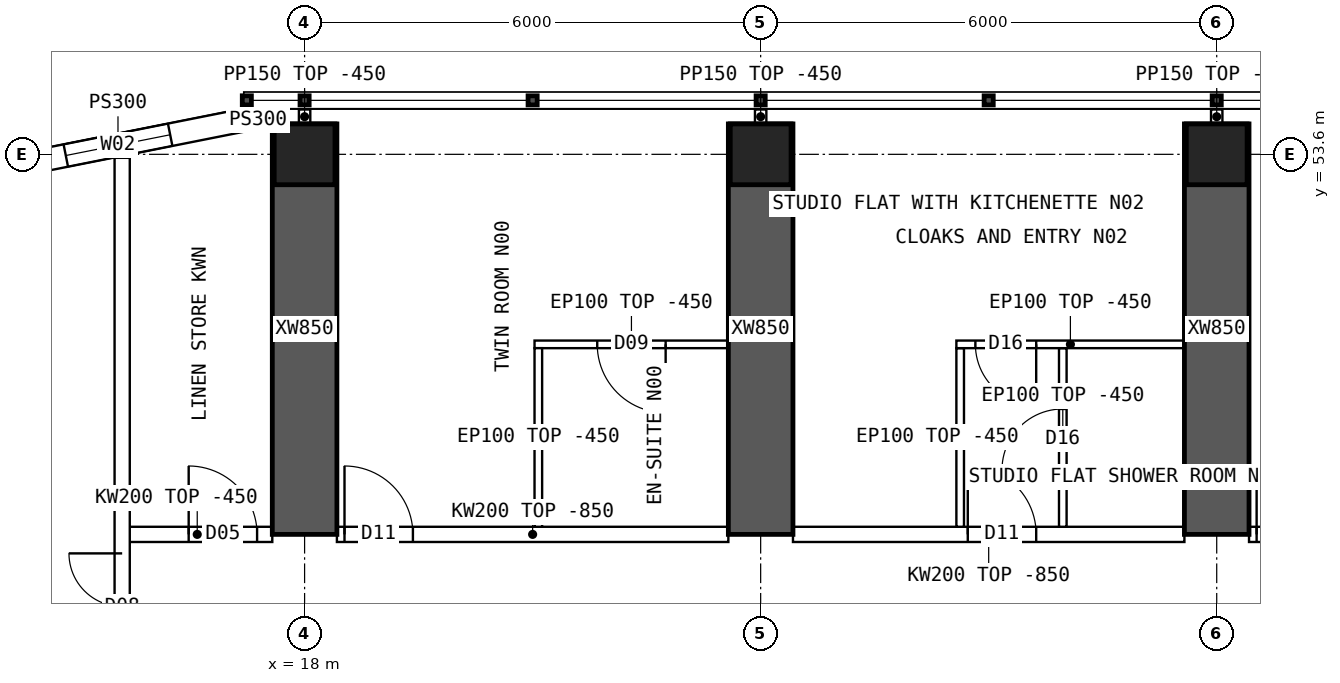
"""IFC4 building model, lengths in metres.
Left out: names, types, materials, properties, quantities, classifications, styles, units other than length and angle.
Written with IfcOpenShell. Run it as: python <this file> out.ifc"""

import sys

from ifc_helpers import new_model, si_unit, direction, frame, frame_2d, origin, origin_2d, place, context, subcontext, project, spatial, polyline, rectangle, hollow_rectangle, outline, extrude, element, fill, save


model = new_model("IFC4")
c1 = context("Model", 3, precision=1e-05, world=origin(), true_north=direction((0.0, 1.0)))
c2 = subcontext(c1, "Body", "Model", "MODEL_VIEW")
j1 = project(units=[si_unit("LENGTHUNIT", "METRE"), si_unit("PLANEANGLEUNIT", "RADIAN")], contexts=[c1])
p1 = place(None, origin())
s1 = spatial("IfcSite", under=j1, at=p1, CompositionType="ELEMENT")
p2 = place(p1, origin())
s2 = spatial("IfcBuilding", under=s1, at=p2, CompositionType="ELEMENT")
p3 = place(p2, frame((0.0, 0.0, 144.85)))
s3 = spatial("IfcBuildingStorey", under=s2, at=p3, CompositionType="ELEMENT", Elevation=144.85)
for number, where, z_axis, x_axis in (
    (1, (18.0, 53.6, 0.0), (0.0, 0.0, 1.0), (1.0, 0.0, 0.0)),
    (2, (24.0, 53.6, 0.0), (0.0, 0.0, 1.0), (1.0, 0.0, 0.0)),
    (3, (30.0, 53.6, 0.0), (0.0, 0.0, 1.0), (1.0, 0.0, 0.0)),
):
    element("IfcColumn", number, at=place(p3, frame(where, z_axis=z_axis, x_axis=x_axis)), inside=s3, PredefinedType="COLUMN", context=c2, shape_type="SweptSolid", body=[
        extrude(hollow_rectangle(XDim=0.8, YDim=0.8, WallThickness=0.08, at=origin_2d()), origin(), (0.0, 0.0, 1.0), 3.75),
    ])
for number, where, z_axis, x_axis in (
    (4, (18.0, 48.6, 0.0), (0.0, 0.0, 1.0), (0.0, 1.0, 0.0)),
    (5, (24.0, 48.6, 0.0), (0.0, 0.0, 1.0), (0.0, 1.0, 0.0)),
    (6, (30.0, 48.6, 0.0), (0.0, 0.0, 1.0), (0.0, 1.0, 0.0)),
):
    element("IfcWall", number, at=place(p3, frame(where, z_axis=z_axis, x_axis=x_axis)), inside=s3, PredefinedType="SHEAR", context=c2, shape_type="SweptSolid", body=[
        extrude(rectangle(XDim=5.4, YDim=0.85, at=frame_2d((2.7, 0.0))), origin(), (0.0, 0.0, 1.0), 3.75),
    ])
p4 = place(p3, frame((17.2, 54.05, 0.0), z_axis=(0.0, 0.0, 1.0), x_axis=(-0.98078325777, -0.195100490205, 0.0)))
e7 = element("IfcWall", 7, at=p4, inside=s3, PredefinedType="SOLIDWALL", context=c2, shape_type="SweptSolid", body=[
    extrude(outline(polyline([(-0.03, -0.15), (3.405, -0.15), (3.345, 0.15), (0.03, 0.15), (-0.03, -0.15)])), origin(), (0.0, 0.0, 1.0), 3.3),
])
p5 = place(p4, frame((0.988, 0.0, 0.9)))
e8 = element("IfcOpeningElement", 8, at=p5, cuts=e7, PredefinedType="OPENING", context=c2, shape_type="SweptSolid", body=[
    extrude(rectangle(XDim=1.4, YDim=1.8, at=frame_2d((0.7, 0.9))), frame((0.0, 0.16, 0.0), z_axis=(0.0, -1.0, 0.0), x_axis=(1.0, 0.0, 0.0)), (0.0, 0.0, 1.0), 0.32),
])
p6 = place(p3, frame((17.2, 54.05, 0.0), z_axis=(0.0, 0.0, 1.0), x_axis=(1.0, 0.0, 0.0)))
e9 = element("IfcWall", 9, at=p6, inside=s3, PredefinedType="SOLIDWALL", context=c2, shape_type="SweptSolid", body=[
    extrude(rectangle(XDim=0.375, YDim=0.3, at=frame_2d((0.188, 0.0))), origin(), (0.0, 0.0, 1.0), 3.3),
])
p7 = place(p3, frame((15.6, 48.6, 0.0), z_axis=(0.0, 0.0, 1.0), x_axis=(1.0, 0.0, 0.0)))
e10 = element("IfcWall", 10, at=p7, inside=s3, PredefinedType="SOLIDWALL", context=c2, shape_type="SweptSolid", body=[
    extrude(rectangle(XDim=1.975, YDim=0.2, at=frame_2d((0.987, 0.0))), origin(), (0.0, 0.0, 1.0), 3.3),
])
p8 = place(p7, frame((0.875, 0.0, 0.0)))
e11 = element("IfcOpeningElement", 11, at=p8, cuts=e10, PredefinedType="OPENING", context=c2, shape_type="SweptSolid", body=[
    extrude(rectangle(XDim=0.9, YDim=2.1, at=frame_2d((0.45, 1.05))), frame((0.0, 0.11, 0.0), z_axis=(0.0, -1.0, 0.0), x_axis=(1.0, 0.0, 0.0)), (0.0, 0.0, 1.0), 0.22),
])
p9 = place(p3, frame((18.425, 48.6, 0.0), z_axis=(0.0, 0.0, 1.0), x_axis=(1.0, 0.0, 0.0)))
e12 = element("IfcWall", 12, at=p9, inside=s3, PredefinedType="SOLIDWALL", context=c2, shape_type="SweptSolid", body=[
    extrude(outline(polyline([(0.0, 0.0), (5.15, 0.0), (5.15, 2.9), (0.0, 2.9), (0.0, 0.0)])), frame((0.0, 0.1, 0.0), z_axis=(0.0, -1.0, 0.0), x_axis=(1.0, 0.0, 0.0)), (0.0, 0.0, 1.0), 0.2),
])
p10 = place(p9, frame((0.1, 0.0, 0.0)))
e13 = element("IfcOpeningElement", 13, at=p10, cuts=e12, PredefinedType="OPENING", context=c2, shape_type="SweptSolid", body=[
    extrude(rectangle(XDim=0.9, YDim=2.1, at=frame_2d((0.45, 1.05))), frame((0.0, 0.11, 0.0), z_axis=(0.0, -1.0, 0.0), x_axis=(1.0, 0.0, 0.0)), (0.0, 0.0, 1.0), 0.22),
])
p11 = place(p3, frame((24.425, 48.6, 0.0), z_axis=(0.0, 0.0, 1.0), x_axis=(1.0, 0.0, 0.0)))
e14 = element("IfcWall", 14, at=p11, inside=s3, PredefinedType="SOLIDWALL", context=c2, shape_type="SweptSolid", body=[
    extrude(outline(polyline([(0.0, 0.0), (5.15, 0.0), (5.15, 2.9), (0.0, 2.9), (0.0, 0.0)])), frame((0.0, 0.1, 0.0), z_axis=(0.0, -1.0, 0.0), x_axis=(1.0, 0.0, 0.0)), (0.0, 0.0, 1.0), 0.2),
])
p12 = place(p11, frame((2.3, 0.0, 0.0)))
e15 = element("IfcOpeningElement", 15, at=p12, cuts=e14, PredefinedType="OPENING", context=c2, shape_type="SweptSolid", body=[
    extrude(rectangle(XDim=0.9, YDim=2.1, at=frame_2d((0.45, 1.05))), frame((0.0, 0.11, 0.0), z_axis=(0.0, -1.0, 0.0), x_axis=(1.0, 0.0, 0.0)), (0.0, 0.0, 1.0), 0.22),
])
p13 = place(p3, frame((30.425, 48.6, 0.0), z_axis=(0.0, 0.0, 1.0), x_axis=(1.0, 0.0, 0.0)))
e16 = element("IfcWall", 16, at=p13, inside=s3, PredefinedType="SOLIDWALL", context=c2, shape_type="SweptSolid", body=[
    extrude(outline(polyline([(0.0, 0.0), (5.15, 0.0), (5.15, 2.9), (0.0, 2.9), (0.0, 0.0)])), frame((0.0, 0.1, 0.0), z_axis=(0.0, -1.0, 0.0), x_axis=(1.0, 0.0, 0.0)), (0.0, 0.0, 1.0), 0.2),
])
p14 = place(p13, frame((0.1, 0.0, 0.0)))
e17 = element("IfcOpeningElement", 17, at=p14, cuts=e16, PredefinedType="OPENING", context=c2, shape_type="SweptSolid", body=[
    extrude(rectangle(XDim=0.9, YDim=2.1, at=frame_2d((0.45, 1.05))), frame((0.0, 0.11, 0.0), z_axis=(0.0, -1.0, 0.0), x_axis=(1.0, 0.0, 0.0)), (0.0, 0.0, 1.0), 0.22),
])
p15 = place(p3, frame((21.025, 51.1, 0.0), z_axis=(0.0, 0.0, 1.0), x_axis=(1.0, 0.0, 0.0)))
e18 = element("IfcWall", 18, at=p15, inside=s3, PredefinedType="PARTITIONING", context=c2, shape_type="SweptSolid", body=[
    extrude(rectangle(XDim=2.55, YDim=0.1, at=frame_2d((1.275, 0.0))), origin(), (0.0, 0.0, 1.0), 3.3),
])
p16 = place(p15, frame((0.825, 0.0, 0.0)))
e19 = element("IfcOpeningElement", 19, at=p16, cuts=e18, PredefinedType="OPENING", context=c2, shape_type="SweptSolid", body=[
    extrude(rectangle(XDim=0.9, YDim=2.1, at=frame_2d((0.45, 1.05))), frame((0.0, 0.06, 0.0), z_axis=(0.0, -1.0, 0.0), x_axis=(1.0, 0.0, 0.0)), (0.0, 0.0, 1.0), 0.12),
])
p17 = place(p3, frame((21.075, 51.05, 0.0), z_axis=(0.0, 0.0, 1.0), x_axis=(0.0, -1.0, 0.0)))
e20 = element("IfcWall", 20, at=p17, inside=s3, PredefinedType="PARTITIONING", context=c2, shape_type="SweptSolid", body=[
    extrude(outline(polyline([(0.0, 0.0), (2.35, 0.0), (2.35, 2.9), (2.302, 2.9), (2.3, 3.3), (0.0, 3.3), (0.0, 0.0)])), frame((0.0, 0.05, 0.0), z_axis=(0.0, -1.0, 0.0), x_axis=(1.0, 0.0, 0.0)), (0.0, 0.0, 1.0), 0.1),
])
p18 = place(p3, frame((26.575, 51.1, 0.0), z_axis=(0.0, 0.0, 1.0), x_axis=(1.0, 0.0, 0.0)))
e21 = element("IfcWall", 21, at=p18, inside=s3, PredefinedType="PARTITIONING", context=c2, shape_type="SweptSolid", body=[
    extrude(rectangle(XDim=3.0, YDim=0.1, at=frame_2d((1.5, 0.0))), origin(), (0.0, 0.0, 1.0), 3.3),
])
p19 = place(p18, frame((0.25, 0.0, 0.0)))
e22 = element("IfcOpeningElement", 22, at=p19, cuts=e21, PredefinedType="OPENING", context=c2, shape_type="SweptSolid", body=[
    extrude(rectangle(XDim=0.8, YDim=2.1, at=frame_2d((0.4, 1.05))), frame((0.0, 0.06, 0.0), z_axis=(0.0, -1.0, 0.0), x_axis=(1.0, 0.0, 0.0)), (0.0, 0.0, 1.0), 0.12),
])
p20 = place(p3, frame((26.625, 51.05, 0.0), z_axis=(0.0, 0.0, 1.0), x_axis=(0.0, -1.0, 0.0)))
e23 = element("IfcWall", 23, at=p20, inside=s3, PredefinedType="PARTITIONING", context=c2, shape_type="SweptSolid", body=[
    extrude(outline(polyline([(0.0, 0.0), (2.35, 0.0), (2.35, 2.9), (2.302, 2.9), (2.3, 3.3), (0.0, 3.3), (0.0, 0.0)])), frame((0.0, 0.05, 0.0), z_axis=(0.0, -1.0, 0.0), x_axis=(1.0, 0.0, 0.0)), (0.0, 0.0, 1.0), 0.1),
])
p21 = place(p3, frame((27.975, 51.05, 0.0), z_axis=(0.0, 0.0, 1.0), x_axis=(0.0, -1.0, 0.0)))
e24 = element("IfcWall", 24, at=p21, inside=s3, PredefinedType="PARTITIONING", context=c2, shape_type="SweptSolid", body=[
    extrude(outline(polyline([(0.0, 0.0), (2.35, 0.0), (2.35, 2.9), (2.302, 2.9), (2.3, 3.3), (0.0, 3.3), (0.0, 0.0)])), frame((0.0, 0.05, 0.0), z_axis=(0.0, -1.0, 0.0), x_axis=(1.0, 0.0, 0.0)), (0.0, 0.0, 1.0), 0.1),
])
p22 = place(p21, frame((0.8, 0.0, 0.0)))
e25 = element("IfcOpeningElement", 25, at=p22, cuts=e24, PredefinedType="OPENING", context=c2, shape_type="SweptSolid", body=[
    extrude(rectangle(XDim=0.8, YDim=2.1, at=frame_2d((0.4, 1.05))), frame((0.0, 0.06, 0.0), z_axis=(0.0, -1.0, 0.0), x_axis=(1.0, 0.0, 0.0)), (0.0, 0.0, 1.0), 0.12),
])
p23 = place(p3, frame((15.6, 10.446, 0.0), z_axis=(0.0, 0.0, 1.0), x_axis=(0.0, 1.0, 0.0)))
e26 = element("IfcWall", 26, at=p23, inside=s3, PredefinedType="SOLIDWALL", context=c2, shape_type="SweptSolid", body=[
    extrude(rectangle(XDim=43.107, YDim=0.2, at=frame_2d((21.554, 0.0))), origin(), (0.0, 0.0, 1.0), 3.3),
])
p24 = place(p23, frame((5.104, 0.0, 0.0)))
e27 = element("IfcOpeningElement", 27, at=p24, cuts=e26, PredefinedType="OPENING", context=c2, shape_type="SweptSolid", body=[
    extrude(rectangle(XDim=1.4, YDim=2.1, at=frame_2d((0.7, 1.05))), frame((0.0, 0.11, 0.0), z_axis=(0.0, -1.0, 0.0), x_axis=(1.0, 0.0, 0.0)), (0.0, 0.0, 1.0), 0.22),
])
p25 = place(p23, frame((36.504, 0.0, 0.0)))
e28 = element("IfcOpeningElement", 28, at=p25, cuts=e26, PredefinedType="OPENING", context=c2, shape_type="SweptSolid", body=[
    extrude(rectangle(XDim=1.4, YDim=2.1, at=frame_2d((0.7, 1.05))), frame((0.0, 0.11, 0.0), z_axis=(0.0, -1.0, 0.0), x_axis=(1.0, 0.0, 0.0)), (0.0, 0.0, 1.0), 0.22),
])
for number, where, z_axis, x_axis in (
    (29, (18.0, 54.0, 0.0), (0.0, 0.0, 1.0), (0.0, 1.0, 0.0)),
    (30, (24.0, 54.0, 0.0), (0.0, 0.0, 1.0), (0.0, 1.0, 0.0)),
    (31, (30.0, 54.0, 0.0), (0.0, 0.0, 1.0), (0.0, 1.0, 0.0)),
):
    element("IfcWall", number, at=place(p3, frame(where, z_axis=z_axis, x_axis=x_axis)), inside=s3, PredefinedType="PARTITIONING", context=c2, shape_type="SweptSolid", body=[
        extrude(rectangle(XDim=0.19, YDim=0.15, at=frame_2d((0.095, 0.0))), origin(), (0.0, 0.0, 1.0), 3.3),
    ])
p26 = place(p5, origin())
e32 = element("IfcWindow", 32, at=p26, inside=s3, PartitioningType="SINGLE_PANEL", PredefinedType="WINDOW", context=c2, shape_type="SweptSolid", body=[
    extrude(rectangle(XDim=1.4, YDim=1.8, at=frame_2d((0.7, 0.9))), frame((0.0, 0.03, 0.0), z_axis=(0.0, -1.0, 0.0), x_axis=(1.0, 0.0, 0.0)), (0.0, 0.0, 1.0), 0.06),
])
fill(e8, e32)
p27 = place(p16, origin())
e33 = element("IfcDoor", 33, at=p27, inside=s3, OperationType="SINGLE_SWING_RIGHT", PredefinedType="DOOR", context=c2, shape_type="SweptSolid", body=[
    extrude(rectangle(XDim=0.9, YDim=2.1, at=frame_2d((0.45, 1.05))), frame((0.0, 0.025, 0.0), z_axis=(0.0, -1.0, 0.0), x_axis=(1.0, 0.0, 0.0)), (0.0, 0.0, 1.0), 0.05),
])
fill(e19, e33)
p28 = place(p10, origin())
e34 = element("IfcDoor", 34, at=p28, inside=s3, OperationType="SINGLE_SWING_LEFT", PredefinedType="DOOR", context=c2, shape_type="SweptSolid", body=[
    extrude(rectangle(XDim=0.9, YDim=2.1, at=frame_2d((0.45, 1.05))), frame((0.0, 0.025, 0.0), z_axis=(0.0, -1.0, 0.0), x_axis=(1.0, 0.0, 0.0)), (0.0, 0.0, 1.0), 0.05),
])
fill(e13, e34)
p29 = place(p19, origin())
e35 = element("IfcDoor", 35, at=p29, inside=s3, OperationType="SINGLE_SWING_RIGHT", PredefinedType="DOOR", context=c2, shape_type="SweptSolid", body=[
    extrude(rectangle(XDim=0.8, YDim=2.1, at=frame_2d((0.4, 1.05))), frame((0.0, 0.025, 0.0), z_axis=(0.0, -1.0, 0.0), x_axis=(1.0, 0.0, 0.0)), (0.0, 0.0, 1.0), 0.05),
])
fill(e22, e35)
p30 = place(p22, origin())
e36 = element("IfcDoor", 36, at=p30, inside=s3, OperationType="SINGLE_SWING_RIGHT", PredefinedType="DOOR", context=c2, shape_type="SweptSolid", body=[
    extrude(rectangle(XDim=0.8, YDim=2.1, at=frame_2d((0.4, 1.05))), frame((0.0, 0.025, 0.0), z_axis=(0.0, -1.0, 0.0), x_axis=(1.0, 0.0, 0.0)), (0.0, 0.0, 1.0), 0.05),
])
fill(e25, e36)
p31 = place(p12, origin())
e37 = element("IfcDoor", 37, at=p31, inside=s3, OperationType="SINGLE_SWING_LEFT", PredefinedType="DOOR", context=c2, shape_type="SweptSolid", body=[
    extrude(rectangle(XDim=0.9, YDim=2.1, at=frame_2d((0.45, 1.05))), frame((0.0, 0.025, 0.0), z_axis=(0.0, -1.0, 0.0), x_axis=(1.0, 0.0, 0.0)), (0.0, 0.0, 1.0), 0.05),
])
fill(e15, e37)
p32 = place(p14, origin())
e38 = element("IfcDoor", 38, at=p32, inside=s3, OperationType="SINGLE_SWING_LEFT", PredefinedType="DOOR", context=c2, shape_type="SweptSolid", body=[
    extrude(rectangle(XDim=0.9, YDim=2.1, at=frame_2d((0.45, 1.05))), frame((0.0, 0.025, 0.0), z_axis=(0.0, -1.0, 0.0), x_axis=(1.0, 0.0, 0.0)), (0.0, 0.0, 1.0), 0.05),
])
fill(e17, e38)
p33 = place(p25, origin())
e39 = element("IfcDoor", 39, at=p33, inside=s3, OperationType="DOUBLE_DOOR_SINGLE_SWING", PredefinedType="DOOR", context=c2, shape_type="SweptSolid", body=[
    extrude(rectangle(XDim=1.4, YDim=2.1, at=frame_2d((0.7, 1.05))), frame((0.0, 0.025, 0.0), z_axis=(0.0, -1.0, 0.0), x_axis=(1.0, 0.0, 0.0)), (0.0, 0.0, 1.0), 0.05),
])
fill(e28, e39)
p34 = place(p8, origin())
e40 = element("IfcDoor", 40, at=p34, inside=s3, OperationType="SINGLE_SWING_LEFT", PredefinedType="DOOR", context=c2, shape_type="SweptSolid", body=[
    extrude(rectangle(XDim=0.9, YDim=2.1, at=frame_2d((0.45, 1.05))), frame((0.0, 0.025, 0.0), z_axis=(0.0, -1.0, 0.0), x_axis=(1.0, 0.0, 0.0)), (0.0, 0.0, 1.0), 0.05),
])
fill(e11, e40)
save(model, sys.argv[1])
